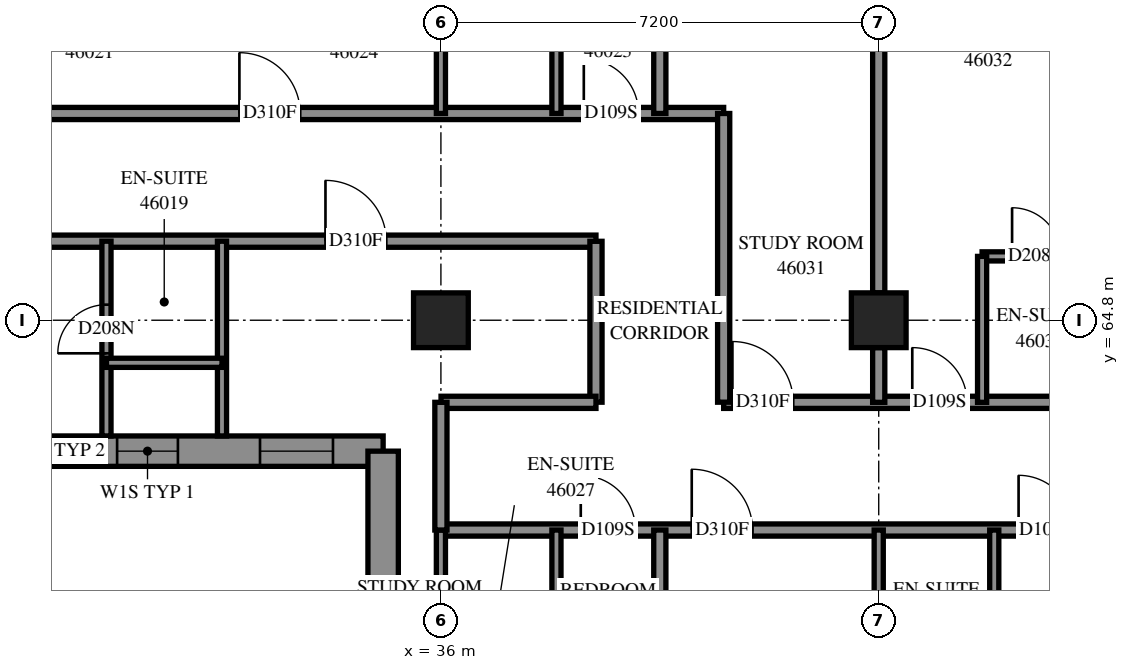
"""IFC4 building model, lengths in metres.
Left out: names, types, materials, properties, quantities, classifications, styles, units other than length and angle.
Written with IfcOpenShell. Run it as: python <this file> out.ifc"""

import sys

from ifc_helpers import new_model, si_unit, direction, frame, frame_2d, origin, origin_2d, place, context, subcontext, project, spatial, polyline, rectangle, outline, extrude, element, fill, save


model = new_model("IFC4")
c1 = context("Model", 3, precision=1e-05, world=origin(), true_north=direction((0.0, 1.0)))
c2 = subcontext(c1, "Body", "Model", "MODEL_VIEW")
j1 = project(units=[si_unit("LENGTHUNIT", "METRE"), si_unit("PLANEANGLEUNIT", "RADIAN")], contexts=[c1])
p1 = place(None, origin())
s1 = spatial("IfcSite", under=j1, at=p1, CompositionType="ELEMENT")
p2 = place(p1, origin())
s2 = spatial("IfcBuilding", under=s1, at=p2, CompositionType="ELEMENT")
p3 = place(p2, frame((0.0, 0.0, 169.4)))
s3 = spatial("IfcBuildingStorey", under=s2, at=p3, CompositionType="ELEMENT", Elevation=169.4)
for number, where, z_axis, x_axis in (
    (1, (36.0, 64.8, 0.0), (0.0, 0.0, 1.0), (1.0, 0.0, 0.0)),
    (2, (43.2, 64.8, 0.0), (0.0, 0.0, 1.0), (1.0, 0.0, 0.0)),
):
    element("IfcColumn", number, at=place(p3, frame(where, z_axis=z_axis, x_axis=x_axis)), inside=s3, PredefinedType="COLUMN", context=c2, shape_type="SweptSolid", body=[
        extrude(rectangle(XDim=0.9, YDim=0.9, at=origin_2d()), origin(), (0.0, 0.0, 1.0), 3.1),
    ])
p4 = place(p3, frame((19.447, 62.647, 0.0), z_axis=(0.0, 0.0, 1.0), x_axis=(1.0, 0.0, 0.0)))
e3 = element("IfcWall", 3, at=p4, inside=s3, PredefinedType="SOLIDWALL", context=c2, shape_type="SweptSolid", body=[
    extrude(outline(polyline([(-0.25, -0.25), (15.353, -0.25), (15.853, 0.25), (0.25, 0.25), (-0.25, -0.25)])), origin(), (0.0, 0.0, 1.0), 3.1),
])
p5 = place(p4, frame((2.553, 0.0, 0.45)))
e4 = element("IfcOpeningElement", 4, at=p5, cuts=e3, PredefinedType="OPENING", context=c2, shape_type="SweptSolid", body=[
    extrude(rectangle(XDim=2.8, YDim=2.5, at=frame_2d((1.4, 1.25))), frame((0.0, 0.26, 0.0), z_axis=(0.0, -1.0, 0.0), x_axis=(1.0, 0.0, 0.0)), (0.0, 0.0, 1.0), 0.52),
])
p6 = place(p4, frame((6.153, 0.0, 0.45)))
e5 = element("IfcOpeningElement", 5, at=p6, cuts=e3, PredefinedType="OPENING", context=c2, shape_type="SweptSolid", body=[
    extrude(rectangle(XDim=2.8, YDim=2.5, at=frame_2d((1.4, 1.25))), frame((0.0, 0.26, 0.0), z_axis=(0.0, -1.0, 0.0), x_axis=(1.0, 0.0, 0.0)), (0.0, 0.0, 1.0), 0.52),
])
p7 = place(p4, frame((0.702, 0.0, 0.45)))
e6 = element("IfcOpeningElement", 6, at=p7, cuts=e3, PredefinedType="OPENING", context=c2, shape_type="SweptSolid", body=[
    extrude(rectangle(XDim=1.2, YDim=2.5, at=frame_2d((0.6, 1.25))), frame((0.0, 0.26, 0.0), z_axis=(0.0, -1.0, 0.0), x_axis=(1.0, 0.0, 0.0)), (0.0, 0.0, 1.0), 0.52),
])
p8 = place(p4, frame((13.578, 0.0, 0.45)))
e7 = element("IfcOpeningElement", 7, at=p8, cuts=e3, PredefinedType="OPENING", context=c2, shape_type="SweptSolid", body=[
    extrude(rectangle(XDim=1.2, YDim=2.5, at=frame_2d((0.6, 1.25))), frame((0.0, 0.26, 0.0), z_axis=(0.0, -1.0, 0.0), x_axis=(1.0, 0.0, 0.0)), (0.0, 0.0, 1.0), 0.52),
])
p9 = place(p4, frame((9.578, 0.0, 0.45)))
e8 = element("IfcOpeningElement", 8, at=p9, cuts=e3, PredefinedType="OPENING", context=c2, shape_type="SweptSolid", body=[
    extrude(rectangle(XDim=1.3, YDim=2.5, at=frame_2d((0.65, 1.25))), frame((0.0, 0.26, 0.0), z_axis=(0.0, -1.0, 0.0), x_axis=(1.0, 0.0, 0.0)), (0.0, 0.0, 1.0), 0.52),
])
p10 = place(p4, frame((11.228, 0.0, 0.45)))
e9 = element("IfcOpeningElement", 9, at=p10, cuts=e3, PredefinedType="OPENING", context=c2, shape_type="SweptSolid", body=[
    extrude(rectangle(XDim=1.0, YDim=2.5, at=frame_2d((0.5, 1.25))), frame((0.0, 0.26, 0.0), z_axis=(0.0, -1.0, 0.0), x_axis=(1.0, 0.0, 0.0)), (0.0, 0.0, 1.0), 0.52),
])
p11 = place(p3, frame((35.05, 62.647, 0.0), z_axis=(0.0, 0.0, 1.0), x_axis=(0.0, -1.0, 0.0)))
e10 = element("IfcWall", 10, at=p11, inside=s3, PredefinedType="SOLIDWALL", context=c2, shape_type="SweptSolid", body=[
    extrude(outline(polyline([(0.25, -0.25), (6.247, -0.25), (5.747, 0.25), (-0.25, 0.25), (0.25, -0.25)])), origin(), (0.0, 0.0, 1.0), 3.1),
])
p12 = place(p11, frame((2.072, 0.0, 0.45)))
e11 = element("IfcOpeningElement", 11, at=p12, cuts=e10, PredefinedType="OPENING", context=c2, shape_type="SweptSolid", body=[
    extrude(rectangle(XDim=1.3, YDim=2.5, at=frame_2d((0.65, 1.25))), frame((0.0, 0.26, 0.0), z_axis=(0.0, -1.0, 0.0), x_axis=(1.0, 0.0, 0.0)), (0.0, 0.0, 1.0), 0.52),
])
p13 = place(p11, frame((3.822, 0.0, 0.45)))
e12 = element("IfcOpeningElement", 12, at=p13, cuts=e10, PredefinedType="OPENING", context=c2, shape_type="SweptSolid", body=[
    extrude(rectangle(XDim=0.8, YDim=2.5, at=frame_2d((0.4, 1.25))), frame((0.0, 0.26, 0.0), z_axis=(0.0, -1.0, 0.0), x_axis=(1.0, 0.0, 0.0)), (0.0, 0.0, 1.0), 0.52),
])
p14 = place(p3, frame((21.602, 68.2, 0.0), z_axis=(0.0, 0.0, 1.0), x_axis=(1.0, 0.0, 0.0)))
e13 = element("IfcWall", 13, at=p14, inside=s3, PredefinedType="PARTITIONING", context=c2, shape_type="SweptSolid", body=[
    extrude(rectangle(XDim=19.048, YDim=0.2, at=frame_2d((9.524, 0.0))), origin(), (0.0, 0.0, 1.0), 3.1),
])
p15 = place(p14, frame((3.998, 0.0, 0.0)))
e14 = element("IfcOpeningElement", 14, at=p15, cuts=e13, PredefinedType="OPENING", context=c2, shape_type="SweptSolid", body=[
    extrude(rectangle(XDim=0.9, YDim=2.1, at=frame_2d((0.45, 1.05))), frame((0.0, 0.11, 0.0), z_axis=(0.0, -1.0, 0.0), x_axis=(1.0, 0.0, 0.0)), (0.0, 0.0, 1.0), 0.22),
])
p16 = place(p14, frame((11.084, 0.0, 0.0)))
e15 = element("IfcOpeningElement", 15, at=p16, cuts=e13, PredefinedType="OPENING", context=c2, shape_type="SweptSolid", body=[
    extrude(rectangle(XDim=1.0, YDim=2.1, at=frame_2d((0.5, 1.05))), frame((0.0, 0.11, 0.0), z_axis=(0.0, -1.0, 0.0), x_axis=(1.0, 0.0, 0.0)), (0.0, 0.0, 1.0), 0.22),
])
p17 = place(p14, frame((16.748, 0.0, 0.0)))
e16 = element("IfcOpeningElement", 16, at=p17, cuts=e13, PredefinedType="OPENING", context=c2, shape_type="SweptSolid", body=[
    extrude(rectangle(XDim=0.9, YDim=2.1, at=frame_2d((0.45, 1.05))), frame((0.0, 0.11, 0.0), z_axis=(0.0, -1.0, 0.0), x_axis=(1.0, 0.0, 0.0)), (0.0, 0.0, 1.0), 0.22),
])
p18 = place(p3, frame((36.0, 61.35, 0.0), z_axis=(0.0, 0.0, 1.0), x_axis=(1.0, 0.0, 0.0)))
e17 = element("IfcWall", 17, at=p18, inside=s3, PredefinedType="PARTITIONING", context=c2, shape_type="SweptSolid", body=[
    extrude(rectangle(XDim=16.95, YDim=0.2, at=frame_2d((8.475, 0.0))), origin(), (0.0, 0.0, 1.0), 3.1),
])
p19 = place(p18, frame((2.3, 0.0, 0.0)))
e18 = element("IfcOpeningElement", 18, at=p19, cuts=e17, PredefinedType="OPENING", context=c2, shape_type="SweptSolid", body=[
    extrude(rectangle(XDim=0.9, YDim=2.1, at=frame_2d((0.45, 1.05))), frame((0.0, 0.11, 0.0), z_axis=(0.0, -1.0, 0.0), x_axis=(1.0, 0.0, 0.0)), (0.0, 0.0, 1.0), 0.22),
])
p20 = place(p18, frame((4.125, 0.0, 0.0)))
e19 = element("IfcOpeningElement", 19, at=p20, cuts=e17, PredefinedType="OPENING", context=c2, shape_type="SweptSolid", body=[
    extrude(rectangle(XDim=1.0, YDim=2.1, at=frame_2d((0.5, 1.05))), frame((0.0, 0.11, 0.0), z_axis=(0.0, -1.0, 0.0), x_axis=(1.0, 0.0, 0.0)), (0.0, 0.0, 1.0), 0.22),
])
p21 = place(p18, frame((9.5, 0.0, 0.0)))
e20 = element("IfcOpeningElement", 20, at=p21, cuts=e17, PredefinedType="OPENING", context=c2, shape_type="SweptSolid", body=[
    extrude(rectangle(XDim=0.9, YDim=2.1, at=frame_2d((0.45, 1.05))), frame((0.0, 0.11, 0.0), z_axis=(0.0, -1.0, 0.0), x_axis=(1.0, 0.0, 0.0)), (0.0, 0.0, 1.0), 0.22),
])
p22 = place(p18, frame((11.635, 0.0, 0.0)))
e21 = element("IfcOpeningElement", 21, at=p22, cuts=e17, PredefinedType="OPENING", context=c2, shape_type="SweptSolid", body=[
    extrude(rectangle(XDim=1.0, YDim=2.1, at=frame_2d((0.5, 1.05))), frame((0.0, 0.11, 0.0), z_axis=(0.0, -1.0, 0.0), x_axis=(1.0, 0.0, 0.0)), (0.0, 0.0, 1.0), 0.22),
])
p23 = place(p18, frame((15.803, 0.0, 0.0)))
e22 = element("IfcOpeningElement", 22, at=p23, cuts=e17, PredefinedType="OPENING", context=c2, shape_type="SweptSolid", body=[
    extrude(rectangle(XDim=1.0, YDim=2.1, at=frame_2d((0.5, 1.05))), frame((0.0, 0.11, 0.0), z_axis=(0.0, -1.0, 0.0), x_axis=(1.0, 0.0, 0.0)), (0.0, 0.0, 1.0), 0.22),
])
p24 = place(p3, frame((21.6, 66.1, 0.0), z_axis=(0.0, 0.0, 1.0), x_axis=(1.0, 0.0, 0.0)))
e23 = element("IfcWall", 23, at=p24, inside=s3, PredefinedType="PARTITIONING", context=c2, shape_type="SweptSolid", body=[
    extrude(rectangle(XDim=16.95, YDim=0.2, at=frame_2d((8.475, 0.0))), origin(), (0.0, 0.0, 1.0), 3.1),
])
p25 = place(p24, frame((0.546, 0.0, 0.0)))
e24 = element("IfcOpeningElement", 24, at=p25, cuts=e23, PredefinedType="OPENING", context=c2, shape_type="SweptSolid", body=[
    extrude(rectangle(XDim=0.9, YDim=2.1, at=frame_2d((0.45, 1.05))), frame((0.0, 0.11, 0.0), z_axis=(0.0, -1.0, 0.0), x_axis=(1.0, 0.0, 0.0)), (0.0, 0.0, 1.0), 0.22),
])
p26 = place(p24, frame((12.502, 0.0, 0.0)))
e25 = element("IfcOpeningElement", 25, at=p26, cuts=e23, PredefinedType="OPENING", context=c2, shape_type="SweptSolid", body=[
    extrude(rectangle(XDim=1.0, YDim=2.1, at=frame_2d((0.5, 1.05))), frame((0.0, 0.11, 0.0), z_axis=(0.0, -1.0, 0.0), x_axis=(1.0, 0.0, 0.0)), (0.0, 0.0, 1.0), 0.22),
])
p27 = place(p3, frame((40.65, 63.45, 0.0), z_axis=(0.0, 0.0, 1.0), x_axis=(1.0, 0.0, 0.0)))
e26 = element("IfcWall", 26, at=p27, inside=s3, PredefinedType="PARTITIONING", context=c2, shape_type="SweptSolid", body=[
    extrude(rectangle(XDim=9.75, YDim=0.2, at=frame_2d((4.875, 0.0))), origin(), (0.0, 0.0, 1.0), 3.1),
])
p28 = place(p27, frame((0.144, 0.0, 0.0)))
e27 = element("IfcOpeningElement", 27, at=p28, cuts=e26, PredefinedType="OPENING", context=c2, shape_type="SweptSolid", body=[
    extrude(rectangle(XDim=1.0, YDim=2.1, at=frame_2d((0.5, 1.05))), frame((0.0, 0.11, 0.0), z_axis=(0.0, -1.0, 0.0), x_axis=(1.0, 0.0, 0.0)), (0.0, 0.0, 1.0), 0.22),
])
p29 = place(p27, frame((3.102, 0.0, 0.0)))
e28 = element("IfcOpeningElement", 28, at=p29, cuts=e26, PredefinedType="OPENING", context=c2, shape_type="SweptSolid", body=[
    extrude(rectangle(XDim=0.9, YDim=2.1, at=frame_2d((0.45, 1.05))), frame((0.0, 0.11, 0.0), z_axis=(0.0, -1.0, 0.0), x_axis=(1.0, 0.0, 0.0)), (0.0, 0.0, 1.0), 0.22),
])
p30 = place(p27, frame((8.319, 0.0, 0.0)))
e29 = element("IfcOpeningElement", 29, at=p30, cuts=e26, PredefinedType="OPENING", context=c2, shape_type="SweptSolid", body=[
    extrude(rectangle(XDim=0.9, YDim=2.1, at=frame_2d((0.45, 1.05))), frame((0.0, 0.11, 0.0), z_axis=(0.0, -1.0, 0.0), x_axis=(1.0, 0.0, 0.0)), (0.0, 0.0, 1.0), 0.22),
])
p31 = place(p3, frame((43.2, 65.25, 0.0), z_axis=(0.0, 0.0, 1.0), x_axis=(0.0, 1.0, 0.0)))
e30 = element("IfcWall", 30, at=p31, inside=s3, PredefinedType="PARTITIONING", context=c2, shape_type="SweptSolid", body=[
    extrude(rectangle(XDim=6.3, YDim=0.2, at=frame_2d((3.15, 0.0))), origin(), (0.0, 0.0, 1.0), 3.1),
])
p32 = place(p3, frame((40.65, 63.452, 0.0), z_axis=(0.0, 0.0, 1.0), x_axis=(0.0, 1.0, 0.0)))
e31 = element("IfcWall", 31, at=p32, inside=s3, PredefinedType="PARTITIONING", context=c2, shape_type="SweptSolid", body=[
    extrude(rectangle(XDim=4.748, YDim=0.2, at=frame_2d((2.374, 0.0))), origin(), (0.0, 0.0, 1.0), 3.1),
])
p33 = place(p3, frame((39.6, 68.2, 0.0), z_axis=(0.0, 0.0, 1.0), x_axis=(0.0, 1.0, 0.0)))
e32 = element("IfcWall", 32, at=p33, inside=s3, PredefinedType="PARTITIONING", context=c2, shape_type="SweptSolid", body=[
    extrude(rectangle(XDim=4.706, YDim=0.2, at=frame_2d((2.353, 0.0))), origin(), (0.0, 0.0, 1.0), 3.1),
])
p34 = place(p3, frame((39.6, 56.9, 0.0), z_axis=(0.0, 0.0, 1.0), x_axis=(0.0, 1.0, 0.0)))
e33 = element("IfcWall", 33, at=p34, inside=s3, PredefinedType="PARTITIONING", context=c2, shape_type="SweptSolid", body=[
    extrude(rectangle(XDim=4.45, YDim=0.2, at=frame_2d((2.225, 0.0))), origin(), (0.0, 0.0, 1.0), 3.1),
])
p35 = place(p3, frame((44.9, 65.85, 0.0), z_axis=(0.0, 0.0, 1.0), x_axis=(1.0, 0.0, 0.0)))
e34 = element("IfcWall", 34, at=p35, inside=s3, PredefinedType="PARTITIONING", context=c2, shape_type="SweptSolid", body=[
    extrude(rectangle(XDim=3.8, YDim=0.15, at=frame_2d((1.9, 0.0))), origin(), (0.0, 0.0, 1.0), 3.1),
])
p36 = place(p35, frame((0.493, 0.0, 0.0)))
e35 = element("IfcOpeningElement", 35, at=p36, cuts=e34, PredefinedType="OPENING", context=c2, shape_type="SweptSolid", body=[
    extrude(rectangle(XDim=0.8, YDim=2.1, at=frame_2d((0.4, 1.05))), frame((0.0, 0.085, 0.0), z_axis=(0.0, -1.0, 0.0), x_axis=(1.0, 0.0, 0.0)), (0.0, 0.0, 1.0), 0.17),
])
p37 = place(p35, frame((2.507, 0.0, 0.0)))
e36 = element("IfcOpeningElement", 36, at=p37, cuts=e34, PredefinedType="OPENING", context=c2, shape_type="SweptSolid", body=[
    extrude(rectangle(XDim=0.8, YDim=2.1, at=frame_2d((0.4, 1.05))), frame((0.0, 0.085, 0.0), z_axis=(0.0, -1.0, 0.0), x_axis=(1.0, 0.0, 0.0)), (0.0, 0.0, 1.0), 0.17),
])
p38 = place(p3, frame((32.4, 62.897, 0.0), z_axis=(0.0, 0.0, 1.0), x_axis=(0.0, 1.0, 0.0)))
e37 = element("IfcWall", 37, at=p38, inside=s3, PredefinedType="PARTITIONING", context=c2, shape_type="SweptSolid", body=[
    extrude(rectangle(XDim=3.203, YDim=0.15, at=frame_2d((1.601, 0.0))), origin(), (0.0, 0.0, 1.0), 3.1),
])
p39 = place(p3, frame((30.5, 62.897, 0.0), z_axis=(0.0, 0.0, 1.0), x_axis=(0.0, 1.0, 0.0)))
e38 = element("IfcWall", 38, at=p39, inside=s3, PredefinedType="PARTITIONING", context=c2, shape_type="SweptSolid", body=[
    extrude(rectangle(XDim=3.203, YDim=0.15, at=frame_2d((1.601, 0.0))), origin(), (0.0, 0.0, 1.0), 3.1),
])
p40 = place(p39, frame((1.359, 0.0, 0.0)))
e39 = element("IfcOpeningElement", 39, at=p40, cuts=e38, PredefinedType="OPENING", context=c2, shape_type="SweptSolid", body=[
    extrude(rectangle(XDim=0.8, YDim=2.1, at=frame_2d((0.4, 1.05))), frame((0.0, 0.085, 0.0), z_axis=(0.0, -1.0, 0.0), x_axis=(1.0, 0.0, 0.0)), (0.0, 0.0, 1.0), 0.17),
])
p41 = place(p3, frame((38.55, 63.452, 0.0), z_axis=(0.0, 0.0, 1.0), x_axis=(0.0, 1.0, 0.0)))
e40 = element("IfcWall", 40, at=p41, inside=s3, PredefinedType="PARTITIONING", context=c2, shape_type="SweptSolid", body=[
    extrude(rectangle(XDim=2.646, YDim=0.2, at=frame_2d((1.323, 0.0))), origin(), (0.0, 0.0, 1.0), 3.1),
])
p42 = place(p3, frame((36.002, 63.45, 0.0), z_axis=(0.0, 0.0, 1.0), x_axis=(1.0, 0.0, 0.0)))
e41 = element("IfcWall", 41, at=p42, inside=s3, PredefinedType="PARTITIONING", context=c2, shape_type="SweptSolid", body=[
    extrude(rectangle(XDim=2.548, YDim=0.2, at=frame_2d((1.274, 0.0))), origin(), (0.0, 0.0, 1.0), 3.1),
])
p43 = place(p3, frame((37.9, 58.95, 0.0), z_axis=(0.0, 0.0, 1.0), x_axis=(0.0, 1.0, 0.0)))
e42 = element("IfcWall", 42, at=p43, inside=s3, PredefinedType="PARTITIONING", context=c2, shape_type="SweptSolid", body=[
    extrude(rectangle(XDim=2.4, YDim=0.15, at=frame_2d((1.2, 0.0))), origin(), (0.0, 0.0, 1.0), 3.1),
])
p44 = place(p3, frame((36.0, 58.95, 0.0), z_axis=(0.0, 0.0, 1.0), x_axis=(0.0, 1.0, 0.0)))
e43 = element("IfcWall", 43, at=p44, inside=s3, PredefinedType="PARTITIONING", context=c2, shape_type="SweptSolid", body=[
    extrude(rectangle(XDim=2.4, YDim=0.15, at=frame_2d((1.2, 0.0))), origin(), (0.0, 0.0, 1.0), 2.6),
])
for number, where, z_axis, x_axis in (
    (44, (45.1, 58.95, 0.0), (0.0, 0.0, 1.0), (0.0, 1.0, 0.0)),
    (45, (43.2, 58.95, 0.0), (0.0, 0.0, 1.0), (0.0, 1.0, 0.0)),
    (46, (37.9, 68.2, 0.0), (0.0, 0.0, 1.0), (0.0, 1.0, 0.0)),
    (47, (36.0, 68.2, 0.0), (0.0, 0.0, 1.0), (0.0, 1.0, 0.0)),
    (48, (44.9, 63.45, 0.0), (0.0, 0.0, 1.0), (0.0, 1.0, 0.0)),
):
    element("IfcWall", number, at=place(p3, frame(where, z_axis=z_axis, x_axis=x_axis)), inside=s3, PredefinedType="PARTITIONING", context=c2, shape_type="SweptSolid", body=[
        extrude(rectangle(XDim=2.4, YDim=0.15, at=frame_2d((1.2, 0.0))), origin(), (0.0, 0.0, 1.0), 3.1),
    ])
p45 = place(p3, frame((36.0, 61.35, 0.0), z_axis=(0.0, 0.0, 1.0), x_axis=(0.0, 1.0, 0.0)))
e49 = element("IfcWall", 49, at=p45, inside=s3, PredefinedType="PARTITIONING", context=c2, shape_type="SweptSolid", body=[
    extrude(rectangle(XDim=2.1, YDim=0.2, at=frame_2d((1.05, 0.0))), origin(), (0.0, 0.0, 1.0), 2.6),
])
p46 = place(p3, frame((30.5, 64.1, 0.0), z_axis=(0.0, 0.0, 1.0), x_axis=(1.0, 0.0, 0.0)))
e50 = element("IfcWall", 50, at=p46, inside=s3, PredefinedType="PARTITIONING", context=c2, shape_type="SweptSolid", body=[
    extrude(rectangle(XDim=1.9, YDim=0.15, at=frame_2d((0.95, 0.0))), origin(), (0.0, 0.0, 1.0), 3.1),
])
p47 = place(p3, frame((43.2, 63.45, 0.0), z_axis=(0.0, 0.0, 1.0), x_axis=(0.0, 1.0, 0.0)))
e51 = element("IfcWall", 51, at=p47, inside=s3, PredefinedType="PARTITIONING", context=c2, shape_type="SweptSolid", body=[
    extrude(rectangle(XDim=0.9, YDim=0.2, at=frame_2d((0.45, 0.0))), origin(), (0.0, 0.0, 1.0), 3.1),
])
p48 = place(p8, origin())
e52 = element("IfcWindow", 52, at=p48, inside=s3, PartitioningType="SINGLE_PANEL", PredefinedType="WINDOW", context=c2, shape_type="SweptSolid", body=[
    extrude(rectangle(XDim=1.2, YDim=2.5, at=frame_2d((0.6, 1.25))), frame((0.0, 0.18, 0.0), z_axis=(0.0, -1.0, 0.0), x_axis=(1.0, 0.0, 0.0)), (0.0, 0.0, 1.0), 0.06),
])
fill(e7, e52)
p49 = place(p40, origin())
e53 = element("IfcDoor", 53, at=p49, inside=s3, OperationType="SINGLE_SWING_RIGHT", PredefinedType="DOOR", context=c2, shape_type="SweptSolid", body=[
    extrude(rectangle(XDim=0.8, YDim=2.1, at=frame_2d((0.4, 1.05))), frame((0.0, 0.025, 0.0), z_axis=(0.0, -1.0, 0.0), x_axis=(1.0, 0.0, 0.0)), (0.0, 0.0, 1.0), 0.05),
])
fill(e39, e53)
p50 = place(p16, origin())
e54 = element("IfcDoor", 54, at=p50, inside=s3, OperationType="SINGLE_SWING_RIGHT", PredefinedType="DOOR", context=c2, shape_type="SweptSolid", body=[
    extrude(rectangle(XDim=1.0, YDim=2.1, at=frame_2d((0.5, 1.05))), frame((0.0, 0.025, 0.0), z_axis=(0.0, -1.0, 0.0), x_axis=(1.0, 0.0, 0.0)), (0.0, 0.0, 1.0), 0.05),
])
fill(e15, e54)
p51 = place(p17, origin())
e55 = element("IfcDoor", 55, at=p51, inside=s3, OperationType="SINGLE_SWING_RIGHT", PredefinedType="DOOR", context=c2, shape_type="SweptSolid", body=[
    extrude(rectangle(XDim=0.9, YDim=2.1, at=frame_2d((0.45, 1.05))), frame((0.0, 0.025, 0.0), z_axis=(0.0, -1.0, 0.0), x_axis=(1.0, 0.0, 0.0)), (0.0, 0.0, 1.0), 0.05),
])
fill(e16, e55)
p52 = place(p26, origin())
e56 = element("IfcDoor", 56, at=p52, inside=s3, OperationType="SINGLE_SWING_RIGHT", PredefinedType="DOOR", context=c2, shape_type="SweptSolid", body=[
    extrude(rectangle(XDim=1.0, YDim=2.1, at=frame_2d((0.5, 1.05))), frame((0.0, 0.025, 0.0), z_axis=(0.0, -1.0, 0.0), x_axis=(1.0, 0.0, 0.0)), (0.0, 0.0, 1.0), 0.05),
])
fill(e25, e56)
p53 = place(p19, origin())
e57 = element("IfcDoor", 57, at=p53, inside=s3, OperationType="SINGLE_SWING_LEFT", PredefinedType="DOOR", context=c2, shape_type="SweptSolid", body=[
    extrude(rectangle(XDim=0.9, YDim=2.1, at=frame_2d((0.45, 1.05))), frame((0.0, 0.025, 0.0), z_axis=(0.0, -1.0, 0.0), x_axis=(1.0, 0.0, 0.0)), (0.0, 0.0, 1.0), 0.05),
])
fill(e18, e57)
p54 = place(p20, origin())
e58 = element("IfcDoor", 58, at=p54, inside=s3, OperationType="SINGLE_SWING_RIGHT", PredefinedType="DOOR", context=c2, shape_type="SweptSolid", body=[
    extrude(rectangle(XDim=1.0, YDim=2.1, at=frame_2d((0.5, 1.05))), frame((0.0, 0.025, 0.0), z_axis=(0.0, -1.0, 0.0), x_axis=(1.0, 0.0, 0.0)), (0.0, 0.0, 1.0), 0.05),
])
fill(e19, e58)
p55 = place(p21, origin())
e59 = element("IfcDoor", 59, at=p55, inside=s3, OperationType="SINGLE_SWING_LEFT", PredefinedType="DOOR", context=c2, shape_type="SweptSolid", body=[
    extrude(rectangle(XDim=0.9, YDim=2.1, at=frame_2d((0.45, 1.05))), frame((0.0, 0.025, 0.0), z_axis=(0.0, -1.0, 0.0), x_axis=(1.0, 0.0, 0.0)), (0.0, 0.0, 1.0), 0.05),
])
fill(e20, e59)
p56 = place(p28, origin())
e60 = element("IfcDoor", 60, at=p56, inside=s3, OperationType="SINGLE_SWING_LEFT", PredefinedType="DOOR", context=c2, shape_type="SweptSolid", body=[
    extrude(rectangle(XDim=1.0, YDim=2.1, at=frame_2d((0.5, 1.05))), frame((0.0, 0.025, 0.0), z_axis=(0.0, -1.0, 0.0), x_axis=(1.0, 0.0, 0.0)), (0.0, 0.0, 1.0), 0.05),
])
fill(e27, e60)
p57 = place(p29, origin())
e61 = element("IfcDoor", 61, at=p57, inside=s3, OperationType="SINGLE_SWING_RIGHT", PredefinedType="DOOR", context=c2, shape_type="SweptSolid", body=[
    extrude(rectangle(XDim=0.9, YDim=2.1, at=frame_2d((0.45, 1.05))), frame((0.0, 0.025, 0.0), z_axis=(0.0, -1.0, 0.0), x_axis=(1.0, 0.0, 0.0)), (0.0, 0.0, 1.0), 0.05),
])
fill(e28, e61)
p58 = place(p36, origin())
e62 = element("IfcDoor", 62, at=p58, inside=s3, OperationType="SINGLE_SWING_RIGHT", PredefinedType="DOOR", context=c2, shape_type="SweptSolid", body=[
    extrude(rectangle(XDim=0.8, YDim=2.1, at=frame_2d((0.4, 1.05))), frame((0.0, 0.025, 0.0), z_axis=(0.0, -1.0, 0.0), x_axis=(1.0, 0.0, 0.0)), (0.0, 0.0, 1.0), 0.05),
])
fill(e35, e62)
p59 = place(p9, origin())
e63 = element("IfcWindow", 63, at=p59, inside=s3, PartitioningType="SINGLE_PANEL", PredefinedType="WINDOW", context=c2, shape_type="SweptSolid", body=[
    extrude(rectangle(XDim=1.3, YDim=2.5, at=frame_2d((0.65, 1.25))), frame((0.0, 0.18, 0.0), z_axis=(0.0, -1.0, 0.0), x_axis=(1.0, 0.0, 0.0)), (0.0, 0.0, 1.0), 0.06),
])
fill(e8, e63)
p60 = place(p10, origin())
e64 = element("IfcWindow", 64, at=p60, inside=s3, PartitioningType="SINGLE_PANEL", PredefinedType="WINDOW", context=c2, shape_type="SweptSolid", body=[
    extrude(rectangle(XDim=1.0, YDim=2.5, at=frame_2d((0.5, 1.25))), frame((0.0, 0.18, 0.0), z_axis=(0.0, -1.0, 0.0), x_axis=(1.0, 0.0, 0.0)), (0.0, 0.0, 1.0), 0.06),
])
fill(e9, e64)
p61 = place(p12, origin())
e65 = element("IfcWindow", 65, at=p61, inside=s3, PartitioningType="SINGLE_PANEL", PredefinedType="WINDOW", context=c2, shape_type="SweptSolid", body=[
    extrude(rectangle(XDim=1.3, YDim=2.5, at=frame_2d((0.65, 1.25))), frame((0.0, 0.18, 0.0), z_axis=(0.0, -1.0, 0.0), x_axis=(1.0, 0.0, 0.0)), (0.0, 0.0, 1.0), 0.06),
])
fill(e11, e65)
save(model, sys.argv[1])
